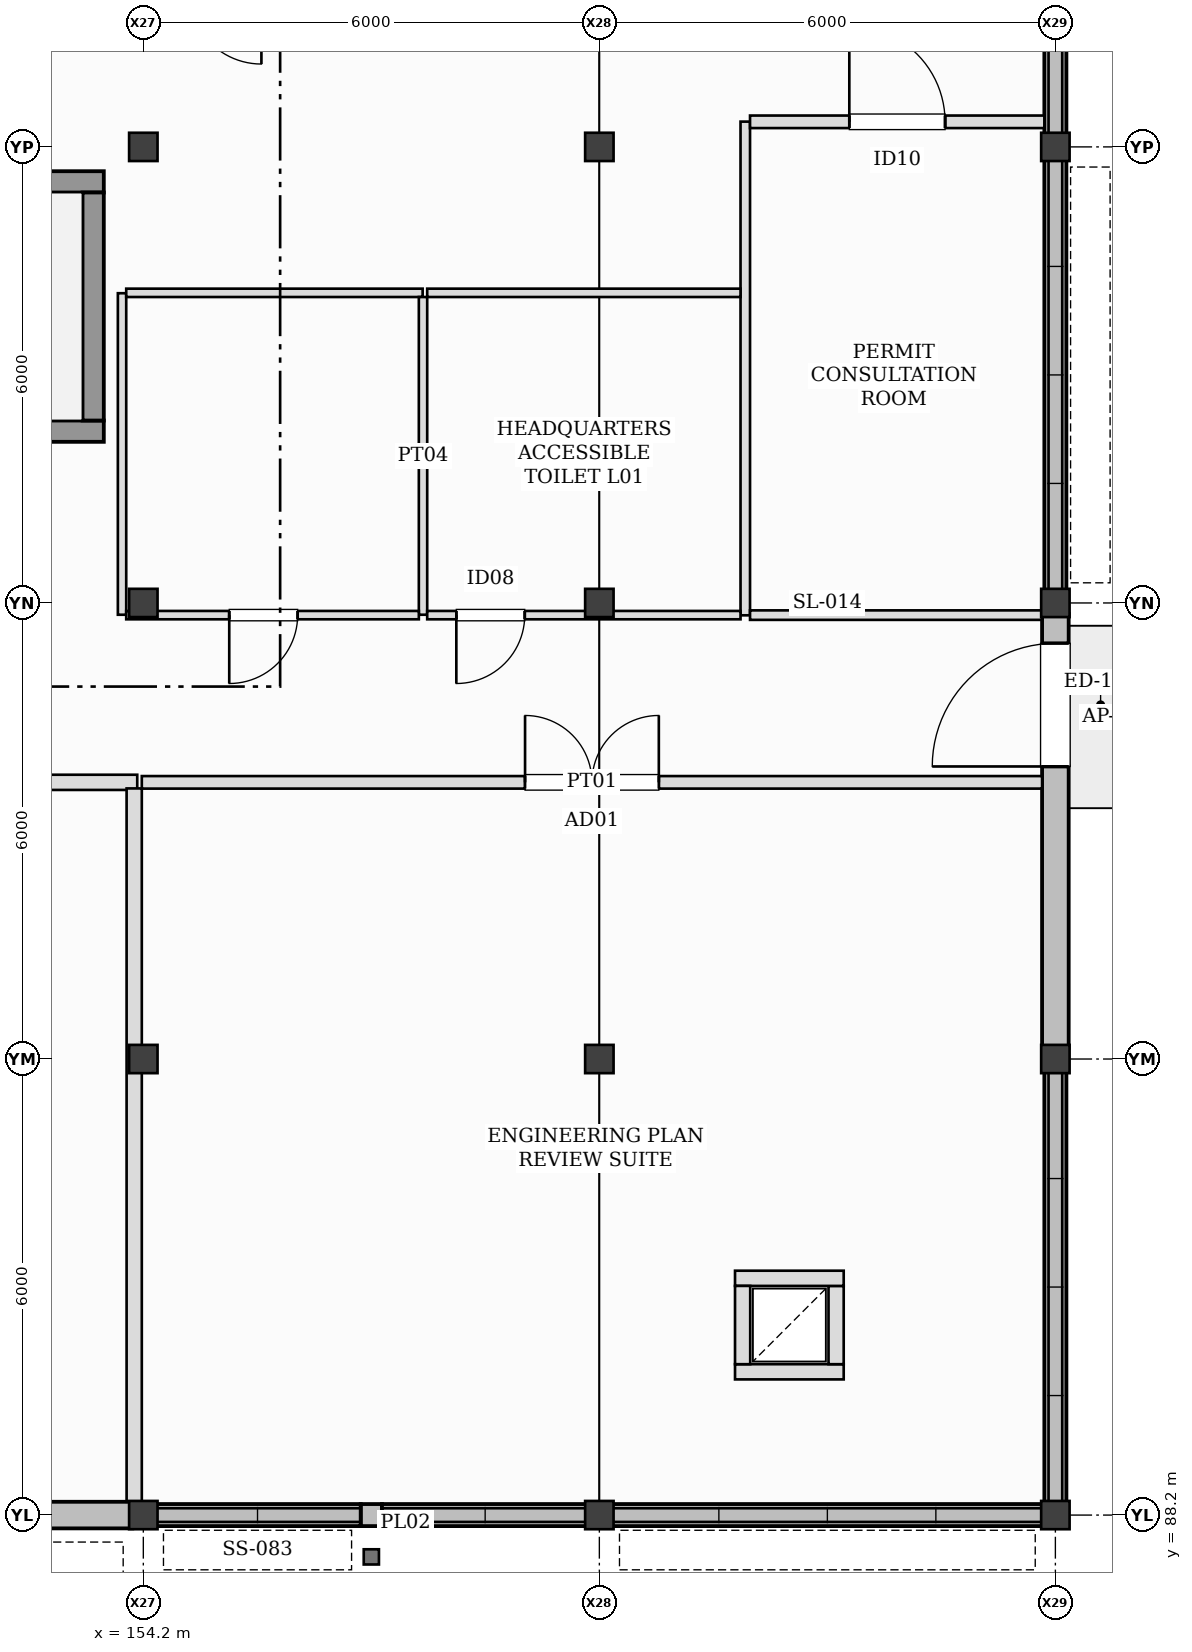
"""IFC4 building model, lengths in metres.
Left out: names, types, materials, properties, quantities, classifications, styles, units other than length and angle.
Written with IfcOpenShell. Run it as: python <this file> out.ifc"""

import sys

from ifc_helpers import new_model, si_unit, direction, frame, frame_2d, origin, origin_2d, place, context, subcontext, project, spatial, rectangle, hollow_rectangle, i_section, extrude, element, fill, save


model = new_model("IFC4")
c1 = context("Model", 3, precision=1e-05, world=origin(), true_north=direction((0.0, 1.0)))
c2 = subcontext(c1, "Body", "Model", "MODEL_VIEW")
j1 = project(units=[si_unit("LENGTHUNIT", "METRE"), si_unit("PLANEANGLEUNIT", "RADIAN")], contexts=[c1])
p1 = place(None, origin())
s1 = spatial("IfcSite", under=j1, at=p1, CompositionType="ELEMENT")
p2 = place(p1, origin())
s2 = spatial("IfcBuilding", under=s1, at=p2, CompositionType="ELEMENT")
p3 = place(p2, origin())
s3 = spatial("IfcBuildingStorey", under=s2, at=p3, CompositionType="ELEMENT", Elevation=0.0)
for number, where, z_axis, x_axis in (
    (1, (154.2, 88.2, 0.0), (0.0, 0.0, 1.0), (1.0, 0.0, 0.0)),
    (2, (154.2, 94.2, 0.0), (0.0, 0.0, 1.0), (1.0, 0.0, 0.0)),
    (3, (154.2, 100.2, 0.0), (0.0, 0.0, 1.0), (1.0, 0.0, 0.0)),
    (4, (154.2, 106.2, 0.0), (0.0, 0.0, 1.0), (1.0, 0.0, 0.0)),
    (5, (160.2, 88.2, 0.0), (0.0, 0.0, 1.0), (1.0, 0.0, 0.0)),
    (6, (160.2, 94.2, 0.0), (0.0, 0.0, 1.0), (1.0, 0.0, 0.0)),
    (7, (160.2, 100.2, 0.0), (0.0, 0.0, 1.0), (1.0, 0.0, 0.0)),
    (8, (160.2, 106.2, 0.0), (0.0, 0.0, 1.0), (1.0, 0.0, 0.0)),
    (9, (166.2, 88.2, 0.0), (0.0, 0.0, 1.0), (1.0, 0.0, 0.0)),
    (10, (166.2, 94.2, 0.0), (0.0, 0.0, 1.0), (1.0, 0.0, 0.0)),
    (11, (166.2, 100.2, 0.0), (0.0, 0.0, 1.0), (1.0, 0.0, 0.0)),
    (12, (166.2, 106.2, 0.0), (0.0, 0.0, 1.0), (1.0, 0.0, 0.0)),
):
    element("IfcColumn", number, at=place(p3, frame(where, z_axis=z_axis, x_axis=x_axis)), inside=s3, PredefinedType="COLUMN", context=c2, shape_type="SweptSolid", body=[
        extrude(i_section(OverallWidth=0.374, OverallDepth=0.372, WebThickness=0.016, FlangeThickness=0.026, at=origin_2d()), origin(), (0.0, 0.0, 1.0), 6.0),
    ])
p4 = place(p3, frame((157.2, 87.65, -0.35), z_axis=(0.0, 0.0, 1.0), x_axis=(1.0, 0.0, 0.0)))
e13 = element("IfcColumn", 13, at=p4, inside=s3, PredefinedType="PILASTER", context=c2, shape_type="SweptSolid", body=[
    extrude(hollow_rectangle(XDim=0.2, YDim=0.2, WallThickness=0.01, at=origin_2d()), origin(), (0.0, 0.0, 1.0), 6.35),
])
p5 = place(p3, frame((148.345, 88.2, 0.0), z_axis=(0.0, 0.0, 1.0), x_axis=(1.0, 0.0, 0.0)))
e14 = element("IfcWall", 14, at=p5, inside=s3, PredefinedType="STANDARD", context=c2, shape_type="SweptSolid", body=[
    extrude(rectangle(XDim=5.71, YDim=0.35, at=frame_2d((2.855, 0.0))), origin(), (0.0, 0.0, 1.0), 5.113),
])
p6 = place(p5, frame((2.345, 0.0, 0.85)))
e15 = element("IfcOpeningElement", 15, at=p6, cuts=e14, PredefinedType="OPENING", context=c2, shape_type="SweptSolid", body=[
    extrude(rectangle(XDim=1.02, YDim=2.05, at=frame_2d((0.51, 1.025))), frame((0.0, 0.185, 0.0), z_axis=(0.0, -1.0, 0.0), x_axis=(1.0, 0.0, 0.0)), (0.0, 0.0, 1.0), 0.37),
])
p7 = place(p3, frame((157.06, 88.2, 0.0), z_axis=(0.0, 0.0, 1.0), x_axis=(1.0, 0.0, 0.0)))
e16 = element("IfcWall", 16, at=p7, inside=s3, PredefinedType="STANDARD", context=c2, shape_type="SweptSolid", body=[
    extrude(rectangle(XDim=0.28, YDim=0.29, at=frame_2d((0.14, 0.0))), origin(), (0.0, 0.0, 1.0), 5.113),
])
p8 = place(p3, frame((154.345, 88.2, 0.0), z_axis=(0.0, 0.0, 1.0), x_axis=(1.0, 0.0, 0.0)))
e17 = element("IfcWall", 17, at=p8, inside=s3, PredefinedType="STANDARD", context=c2, shape_type="SweptSolid", body=[
    extrude(rectangle(XDim=2.715, YDim=0.29, at=frame_2d((1.357, 0.0))), origin(), (0.0, 0.0, 1.0), 0.56),
])
p9 = place(p3, frame((157.34, 88.2, 0.0), z_axis=(0.0, 0.0, 1.0), x_axis=(1.0, 0.0, 0.0)))
e18 = element("IfcWall", 18, at=p9, inside=s3, PredefinedType="STANDARD", context=c2, shape_type="SweptSolid", body=[
    extrude(rectangle(XDim=2.715, YDim=0.29, at=frame_2d((1.357, 0.0))), origin(), (0.0, 0.0, 1.0), 0.68),
])
p10 = place(p3, frame((160.345, 88.2, 0.0), z_axis=(0.0, 0.0, 1.0), x_axis=(1.0, 0.0, 0.0)))
e19 = element("IfcWall", 19, at=p10, inside=s3, PredefinedType="STANDARD", context=c2, shape_type="SweptSolid", body=[
    extrude(rectangle(XDim=5.71, YDim=0.29, at=frame_2d((2.855, 0.0))), origin(), (0.0, 0.0, 1.0), 0.8),
])
p11 = place(p3, frame((166.2, 88.345, 0.0), z_axis=(0.0, 0.0, 1.0), x_axis=(0.0, 1.0, 0.0)))
e20 = element("IfcWall", 20, at=p11, inside=s3, PredefinedType="STANDARD", context=c2, shape_type="SweptSolid", body=[
    extrude(rectangle(XDim=5.71, YDim=0.29, at=frame_2d((2.855, 0.0))), origin(), (0.0, 0.0, 1.0), 0.92),
])
p12 = place(p3, frame((166.2, 94.345, 0.0), z_axis=(0.0, 0.0, 1.0), x_axis=(0.0, 1.0, 0.0)))
e21 = element("IfcWall", 21, at=p12, inside=s3, PredefinedType="STANDARD", context=c2, shape_type="SweptSolid", body=[
    extrude(rectangle(XDim=5.71, YDim=0.35, at=frame_2d((2.855, 0.0))), origin(), (0.0, 0.0, 1.0), 5.044),
])
p13 = place(p12, frame((3.704, 0.0, 0.0)))
e22 = element("IfcOpeningElement", 22, at=p13, cuts=e21, PredefinedType="OPENING", context=c2, shape_type="SweptSolid", body=[
    extrude(rectangle(XDim=1.62, YDim=2.2, at=frame_2d((0.81, 1.1))), frame((0.0, 0.185, 0.0), z_axis=(0.0, -1.0, 0.0), x_axis=(1.0, 0.0, 0.0)), (0.0, 0.0, 1.0), 0.37),
])
p14 = place(p3, frame((166.2, 100.345, 0.0), z_axis=(0.0, 0.0, 1.0), x_axis=(0.0, 1.0, 0.0)))
e23 = element("IfcWall", 23, at=p14, inside=s3, PredefinedType="STANDARD", context=c2, shape_type="SweptSolid", body=[
    extrude(rectangle(XDim=5.71, YDim=0.29, at=frame_2d((2.855, 0.0))), origin(), (0.0, 0.0, 1.0), 0.32),
])
p15 = place(p3, frame((166.2, 106.345, 0.0), z_axis=(0.0, 0.0, 1.0), x_axis=(0.0, 1.0, 0.0)))
e24 = element("IfcWall", 24, at=p15, inside=s3, PredefinedType="STANDARD", context=c2, shape_type="SweptSolid", body=[
    extrude(rectangle(XDim=2.715, YDim=0.29, at=frame_2d((1.357, 0.0))), origin(), (0.0, 0.0, 1.0), 0.44),
])
p16 = place(p3, frame((145.52, 102.46, 0.0), z_axis=(0.0, 0.0, 1.0), x_axis=(1.0, 0.0, 0.0)))
e25 = element("IfcWall", 25, at=p16, inside=s3, PredefinedType="SHEAR", context=c2, shape_type="SweptSolid", body=[
    extrude(rectangle(XDim=8.16, YDim=0.28, at=frame_2d((4.08, 0.0))), origin(), (0.0, 0.0, 1.0), 6.0),
])
p17 = place(p16, frame((0.65, 0.0, 0.0)))
e26 = element("IfcOpeningElement", 26, at=p17, cuts=e25, PredefinedType="OPENING", context=c2, shape_type="SweptSolid", body=[
    extrude(rectangle(XDim=0.98, YDim=2.15, at=frame_2d((0.49, 1.075))), frame((0.0, 0.15, 0.0), z_axis=(0.0, -1.0, 0.0), x_axis=(1.0, 0.0, 0.0)), (0.0, 0.0, 1.0), 0.3),
])
p18 = place(p3, frame((153.68, 105.74, 0.0), z_axis=(0.0, 0.0, 1.0), x_axis=(-1.0, 0.0, 0.0)))
e27 = element("IfcWall", 27, at=p18, inside=s3, PredefinedType="SHEAR", context=c2, shape_type="SweptSolid", body=[
    extrude(rectangle(XDim=8.16, YDim=0.28, at=frame_2d((4.08, 0.0))), origin(), (0.0, 0.0, 1.0), 6.0),
])
p19 = place(p3, frame((153.54, 102.6, 0.0), z_axis=(0.0, 0.0, 1.0), x_axis=(0.0, 1.0, 0.0)))
e28 = element("IfcWall", 28, at=p19, inside=s3, PredefinedType="SHEAR", context=c2, shape_type="SweptSolid", body=[
    extrude(rectangle(XDim=3.0, YDim=0.28, at=frame_2d((1.5, 0.0))), origin(), (0.0, 0.0, 1.0), 6.0),
])
p20 = place(p3, frame((161.985, 90.085, 0.0), z_axis=(0.0, 0.0, 1.0), x_axis=(1.0, 0.0, 0.0)))
e29 = element("IfcWall", 29, at=p20, inside=s3, PredefinedType="PARTITIONING", context=c2, shape_type="SweptSolid", body=[
    extrude(rectangle(XDim=1.43, YDim=0.2, at=frame_2d((0.715, 0.0))), origin(), (0.0, 0.0, 1.0), 5.68),
])
p21 = place(p3, frame((163.315, 90.185, 0.0), z_axis=(0.0, 0.0, 1.0), x_axis=(0.0, 1.0, 0.0)))
e30 = element("IfcWall", 30, at=p21, inside=s3, PredefinedType="PARTITIONING", context=c2, shape_type="SweptSolid", body=[
    extrude(rectangle(XDim=1.03, YDim=0.2, at=frame_2d((0.515, 0.0))), origin(), (0.0, 0.0, 1.0), 5.68),
])
p22 = place(p3, frame((163.415, 91.315, 0.0), z_axis=(0.0, 0.0, 1.0), x_axis=(-1.0, 0.0, 0.0)))
e31 = element("IfcWall", 31, at=p22, inside=s3, PredefinedType="PARTITIONING", context=c2, shape_type="SweptSolid", body=[
    extrude(rectangle(XDim=1.43, YDim=0.2, at=frame_2d((0.715, 0.0))), origin(), (0.0, 0.0, 1.0), 5.68),
])
p23 = place(p3, frame((162.085, 91.215, 0.0), z_axis=(0.0, 0.0, 1.0), x_axis=(0.0, -1.0, 0.0)))
e32 = element("IfcWall", 32, at=p23, inside=s3, PredefinedType="PARTITIONING", context=c2, shape_type="SweptSolid", body=[
    extrude(rectangle(XDim=1.03, YDim=0.2, at=frame_2d((0.515, 0.0))), origin(), (0.0, 0.0, 1.0), 5.249),
])
p24 = place(p3, frame((142.35, 97.84, 0.0), z_axis=(0.0, 0.0, 1.0), x_axis=(1.0, 0.0, 0.0)))
e33 = element("IfcWall", 33, at=p24, inside=s3, PredefinedType="PARTITIONING", context=c2, shape_type="SweptSolid", body=[
    extrude(rectangle(XDim=11.77, YDim=0.2, at=frame_2d((5.885, 0.0))), origin(), (0.0, 0.0, 1.0), 5.68),
])
p25 = place(p3, frame((154.08, 97.76, 0.0), z_axis=(0.0, 0.0, 1.0), x_axis=(0.0, -1.0, 0.0)))
e34 = element("IfcWall", 34, at=p25, inside=s3, PredefinedType="PARTITIONING", context=c2, shape_type="SweptSolid", body=[
    extrude(rectangle(XDim=9.385, YDim=0.2, at=frame_2d((4.692, 0.0))), origin(), (0.0, 0.0, 1.0), 5.044),
])
p26 = place(p3, frame((154.18, 97.84, 0.0), z_axis=(0.0, 0.0, 1.0), x_axis=(1.0, 0.0, 0.0)))
e35 = element("IfcWall", 35, at=p26, inside=s3, PredefinedType="PARTITIONING", context=c2, shape_type="SweptSolid", body=[
    extrude(rectangle(XDim=11.845, YDim=0.165, at=frame_2d((5.922, 0.0))), origin(), (0.0, 0.0, 1.0), 5.68),
])
p27 = place(p26, frame((5.042, 0.0, 0.0)))
e36 = element("IfcOpeningElement", 36, at=p27, cuts=e35, PredefinedType="OPENING", context=c2, shape_type="SweptSolid", body=[
    extrude(rectangle(XDim=1.76, YDim=2.26, at=frame_2d((0.88, 1.13))), frame((0.0, 0.093, 0.0), z_axis=(0.0, -1.0, 0.0), x_axis=(1.0, 0.0, 0.0)), (0.0, 0.0, 1.0), 0.185),
])
p28 = place(p3, frame((153.92, 100.045, 0.0), z_axis=(0.0, 0.0, 1.0), x_axis=(0.0, 1.0, 0.0)))
e37 = element("IfcWall", 37, at=p28, inside=s3, PredefinedType="PARTITIONING", context=c2, shape_type="SweptSolid", body=[
    extrude(rectangle(XDim=4.23, YDim=0.11, at=frame_2d((2.115, 0.0))), origin(), (0.0, 0.0, 1.0), 5.044),
])
p29 = place(p3, frame((153.975, 104.28, 0.0), z_axis=(0.0, 0.0, 1.0), x_axis=(1.0, 0.0, 0.0)))
e38 = element("IfcWall", 38, at=p29, inside=s3, PredefinedType="PARTITIONING", context=c2, shape_type="SweptSolid", body=[
    extrude(rectangle(XDim=3.9, YDim=0.11, at=frame_2d((1.95, 0.0))), origin(), (0.0, 0.0, 1.0), 5.68),
])
p30 = place(p3, frame((157.88, 104.225, 0.0), z_axis=(0.0, 0.0, 1.0), x_axis=(0.0, -1.0, 0.0)))
e39 = element("IfcWall", 39, at=p30, inside=s3, PredefinedType="PARTITIONING", context=c2, shape_type="SweptSolid", body=[
    extrude(rectangle(XDim=4.18, YDim=0.11, at=frame_2d((2.09, 0.0))), origin(), (0.0, 0.0, 1.0), 5.39),
])
p31 = place(p3, frame((157.825, 100.04, 0.0), z_axis=(0.0, 0.0, 1.0), x_axis=(-1.0, 0.0, 0.0)))
e40 = element("IfcWall", 40, at=p31, inside=s3, PredefinedType="PARTITIONING", context=c2, shape_type="SweptSolid", body=[
    extrude(rectangle(XDim=3.85, YDim=0.11, at=frame_2d((1.925, 0.0))), origin(), (0.0, 0.0, 1.0), 5.113),
])
p32 = place(p31, frame((1.594, 0.0, 0.0)))
e41 = element("IfcOpeningElement", 41, at=p32, cuts=e40, PredefinedType="OPENING", context=c2, shape_type="SweptSolid", body=[
    extrude(rectangle(XDim=0.9, YDim=2.1, at=frame_2d((0.45, 1.05))), frame((0.0, 0.065, 0.0), z_axis=(0.0, -1.0, 0.0), x_axis=(1.0, 0.0, 0.0)), (0.0, 0.0, 1.0), 0.13),
])
p33 = place(p3, frame((162.12, 100.038, 0.0), z_axis=(0.0, 0.0, 1.0), x_axis=(0.0, 1.0, 0.0)))
e42 = element("IfcWall", 42, at=p33, inside=s3, PredefinedType="PARTITIONING", context=c2, shape_type="SweptSolid", body=[
    extrude(rectangle(XDim=6.495, YDim=0.125, at=frame_2d((3.248, 0.0))), origin(), (0.0, 0.0, 1.0), 5.451),
])
p34 = place(p3, frame((162.183, 106.53, 0.0), z_axis=(0.0, 0.0, 1.0), x_axis=(1.0, 0.0, 0.0)))
e43 = element("IfcWall", 43, at=p34, inside=s3, PredefinedType="PARTITIONING", context=c2, shape_type="SweptSolid", body=[
    extrude(rectangle(XDim=3.872, YDim=0.165, at=frame_2d((1.936, 0.0))), origin(), (0.0, 0.0, 1.0), 5.113),
])
p35 = place(p34, frame((1.306, 0.0, 0.0)))
e44 = element("IfcOpeningElement", 44, at=p35, cuts=e43, PredefinedType="OPENING", context=c2, shape_type="SweptSolid", body=[
    extrude(rectangle(XDim=1.26, YDim=2.2, at=frame_2d((0.63, 1.1))), frame((0.0, 0.093, 0.0), z_axis=(0.0, -1.0, 0.0), x_axis=(1.0, 0.0, 0.0)), (0.0, 0.0, 1.0), 0.185),
])
p36 = place(p3, frame((166.025, 100.04, 0.0), z_axis=(0.0, 0.0, 1.0), x_axis=(-1.0, 0.0, 0.0)))
e45 = element("IfcWall", 45, at=p36, inside=s3, PredefinedType="PARTITIONING", context=c2, shape_type="SweptSolid", body=[
    extrude(rectangle(XDim=3.842, YDim=0.125, at=frame_2d((1.921, 0.0))), origin(), (0.0, 0.0, 1.0), 5.113),
])
p37 = place(p3, frame((157.935, 104.28, 0.0), z_axis=(0.0, 0.0, 1.0), x_axis=(1.0, 0.0, 0.0)))
e46 = element("IfcWall", 46, at=p37, inside=s3, PredefinedType="PARTITIONING", context=c2, shape_type="SweptSolid", body=[
    extrude(rectangle(XDim=4.123, YDim=0.11, at=frame_2d((2.061, 0.0))), origin(), (0.0, 0.0, 1.0), 5.68),
])
p38 = place(p3, frame((162.058, 100.04, 0.0), z_axis=(0.0, 0.0, 1.0), x_axis=(-1.0, 0.0, 0.0)))
e47 = element("IfcWall", 47, at=p38, inside=s3, PredefinedType="PARTITIONING", context=c2, shape_type="SweptSolid", body=[
    extrude(rectangle(XDim=4.123, YDim=0.11, at=frame_2d((2.061, 0.0))), origin(), (0.0, 0.0, 1.0), 5.113),
])
p39 = place(p38, frame((2.839, 0.0, 0.0)))
e48 = element("IfcOpeningElement", 48, at=p39, cuts=e47, PredefinedType="OPENING", context=c2, shape_type="SweptSolid", body=[
    extrude(rectangle(XDim=0.9, YDim=2.1, at=frame_2d((0.45, 1.05))), frame((0.0, 0.065, 0.0), z_axis=(0.0, -1.0, 0.0), x_axis=(1.0, 0.0, 0.0)), (0.0, 0.0, 1.0), 0.13),
])
p40 = place(p13, frame((1.62, 0.0, 0.0), z_axis=(0.0, 0.0, 1.0), x_axis=(-1.0, 0.0, 0.0)))
e49 = element("IfcDoor", 49, at=p40, inside=s3, OperationType="SINGLE_SWING_LEFT", PredefinedType="DOOR", context=c2, shape_type="SweptSolid", body=[
    extrude(rectangle(XDim=1.62, YDim=2.2, at=frame_2d((0.81, 1.1))), frame((0.0, 0.025, 0.0), z_axis=(0.0, -1.0, 0.0), x_axis=(1.0, 0.0, 0.0)), (0.0, 0.0, 1.0), 0.05),
])
fill(e22, e49)
p41 = place(p27, frame((1.76, 0.0, 0.0), z_axis=(0.0, 0.0, 1.0), x_axis=(-1.0, 0.0, 0.0)))
e50 = element("IfcDoor", 50, at=p41, inside=s3, OperationType="DOUBLE_DOOR_SINGLE_SWING", PredefinedType="DOOR", context=c2, shape_type="SweptSolid", body=[
    extrude(rectangle(XDim=1.76, YDim=2.26, at=frame_2d((0.88, 1.13))), frame((0.0, 0.025, 0.0), z_axis=(0.0, -1.0, 0.0), x_axis=(1.0, 0.0, 0.0)), (0.0, 0.0, 1.0), 0.05),
])
fill(e36, e50)
p42 = place(p32, frame((0.9, 0.0, 0.0), z_axis=(0.0, 0.0, 1.0), x_axis=(-1.0, 0.0, 0.0)))
e51 = element("IfcDoor", 51, at=p42, inside=s3, OperationType="SINGLE_SWING_RIGHT", PredefinedType="DOOR", context=c2, shape_type="SweptSolid", body=[
    extrude(rectangle(XDim=0.9, YDim=2.1, at=frame_2d((0.45, 1.05))), frame((0.0, 0.025, 0.0), z_axis=(0.0, -1.0, 0.0), x_axis=(1.0, 0.0, 0.0)), (0.0, 0.0, 1.0), 0.05),
])
fill(e41, e51)
p43 = place(p35, frame((1.26, 0.0, 0.0), z_axis=(0.0, 0.0, 1.0), x_axis=(-1.0, 0.0, 0.0)))
e52 = element("IfcDoor", 52, at=p43, inside=s3, OperationType="SINGLE_SWING_LEFT", PredefinedType="DOOR", context=c2, shape_type="SweptSolid", body=[
    extrude(rectangle(XDim=1.26, YDim=2.2, at=frame_2d((0.63, 1.1))), frame((0.0, 0.025, 0.0), z_axis=(0.0, -1.0, 0.0), x_axis=(1.0, 0.0, 0.0)), (0.0, 0.0, 1.0), 0.05),
])
fill(e44, e52)
p44 = place(p39, frame((0.9, 0.0, 0.0), z_axis=(0.0, 0.0, 1.0), x_axis=(-1.0, 0.0, 0.0)))
e53 = element("IfcDoor", 53, at=p44, inside=s3, OperationType="SINGLE_SWING_RIGHT", PredefinedType="DOOR", context=c2, shape_type="SweptSolid", body=[
    extrude(rectangle(XDim=0.9, YDim=2.1, at=frame_2d((0.45, 1.05))), frame((0.0, 0.025, 0.0), z_axis=(0.0, -1.0, 0.0), x_axis=(1.0, 0.0, 0.0)), (0.0, 0.0, 1.0), 0.05),
])
fill(e48, e53)
save(model, sys.argv[1])
